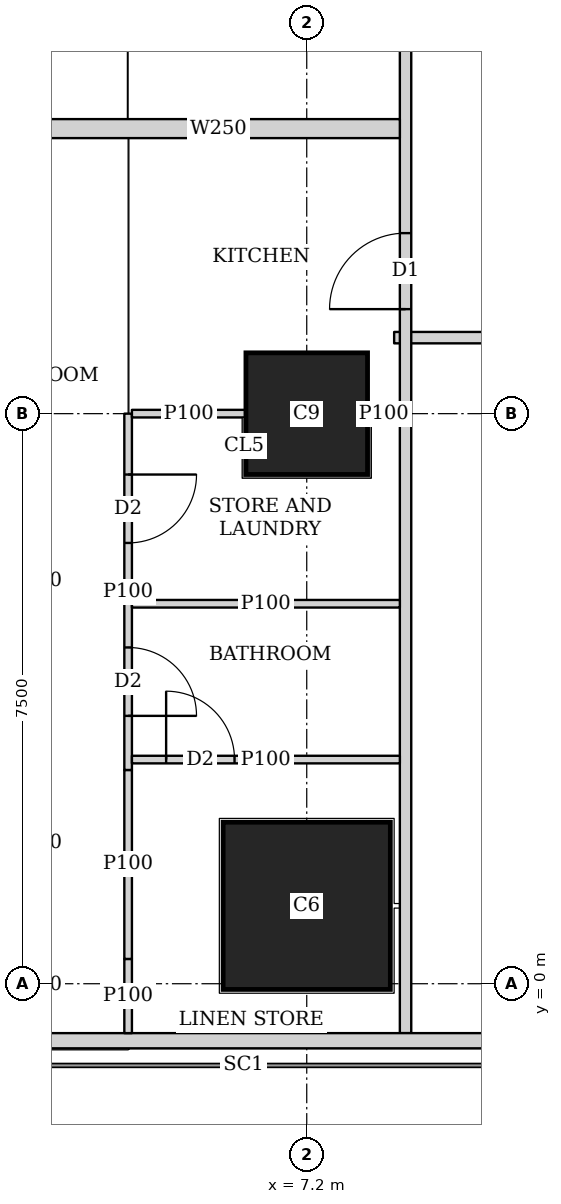
"""IFC4 building model, lengths in metres.
Left out: names, types, materials, properties, quantities, classifications, styles, units other than length and angle.
Written with IfcOpenShell. Run it as: python <this file> out.ifc"""

import sys

from ifc_helpers import new_model, si_unit, direction, frame, frame_2d, origin, origin_2d, place, context, subcontext, project, spatial, rectangle, extrude, element, fill, save


model = new_model("IFC4")
c1 = context("Model", 3, precision=1e-05, world=origin(), true_north=direction((0.0, 1.0)))
c2 = subcontext(c1, "Body", "Model", "MODEL_VIEW")
j1 = project(units=[si_unit("LENGTHUNIT", "METRE"), si_unit("PLANEANGLEUNIT", "RADIAN")], contexts=[c1])
p1 = place(None, origin())
s1 = spatial("IfcSite", under=j1, at=p1, CompositionType="ELEMENT")
p2 = place(p1, origin())
s2 = spatial("IfcBuilding", under=s1, at=p2, CompositionType="ELEMENT")
p3 = place(p2, frame((0.0, 0.0, 111.65)))
s3 = spatial("IfcBuildingStorey", under=s2, at=p3, CompositionType="ELEMENT", Elevation=111.65)
p4 = place(p3, frame((7.2, 1.025, 0.0), z_axis=(0.0, 0.0, 1.0), x_axis=(1.0, 0.0, 0.0)))
e1 = element("IfcColumn", 1, at=p4, inside=s3, PredefinedType="COLUMN", context=c2, shape_type="SweptSolid", body=[
    extrude(rectangle(XDim=2.2, YDim=2.2, at=origin_2d()), origin(), (0.0, 0.0, 1.0), 3.75),
])
p5 = place(p3, frame((7.2, 7.5, 0.0), z_axis=(0.0, 0.0, 1.0), x_axis=(1.0, 0.0, 0.0)))
e2 = element("IfcColumn", 2, at=p5, inside=s3, PredefinedType="COLUMN", context=c2, shape_type="SweptSolid", body=[
    extrude(rectangle(XDim=1.6, YDim=1.6, at=origin_2d()), origin(), (0.0, 0.0, 1.0), 3.75),
])
p6 = place(p3, frame((2.163, -0.75, 0.0), z_axis=(0.0, 0.0, 1.0), x_axis=(1.0, 0.0, 0.0)))
e3 = element("IfcWall", 3, at=p6, inside=s3, PredefinedType="SOLIDWALL", context=c2, shape_type="SweptSolid", body=[
    extrude(rectangle(XDim=45.628, YDim=0.2, at=frame_2d((22.814, 0.0))), origin(), (0.0, 0.0, 1.0), 3.5),
])
p7 = place(p6, frame((9.537, 0.0, 0.9)))
e4 = element("IfcOpeningElement", 4, at=p7, cuts=e3, PredefinedType="OPENING", context=c2, shape_type="SweptSolid", body=[
    extrude(rectangle(XDim=1.8, YDim=1.5, at=frame_2d((0.9, 0.75))), frame((0.0, 0.11, 0.0), z_axis=(0.0, -1.0, 0.0), x_axis=(1.0, 0.0, 0.0)), (0.0, 0.0, 1.0), 0.22),
])
p8 = place(p6, frame((13.137, 0.0, 0.9)))
e5 = element("IfcOpeningElement", 5, at=p8, cuts=e3, PredefinedType="OPENING", context=c2, shape_type="SweptSolid", body=[
    extrude(rectangle(XDim=1.8, YDim=1.5, at=frame_2d((0.9, 0.75))), frame((0.0, 0.11, 0.0), z_axis=(0.0, -1.0, 0.0), x_axis=(1.0, 0.0, 0.0)), (0.0, 0.0, 1.0), 0.22),
])
p9 = place(p6, frame((16.737, 0.0, 0.9)))
e6 = element("IfcOpeningElement", 6, at=p9, cuts=e3, PredefinedType="OPENING", context=c2, shape_type="SweptSolid", body=[
    extrude(rectangle(XDim=1.8, YDim=1.5, at=frame_2d((0.9, 0.75))), frame((0.0, 0.11, 0.0), z_axis=(0.0, -1.0, 0.0), x_axis=(1.0, 0.0, 0.0)), (0.0, 0.0, 1.0), 0.22),
])
p10 = place(p6, frame((20.337, 0.0, 0.9)))
e7 = element("IfcOpeningElement", 7, at=p10, cuts=e3, PredefinedType="OPENING", context=c2, shape_type="SweptSolid", body=[
    extrude(rectangle(XDim=1.8, YDim=1.5, at=frame_2d((0.9, 0.75))), frame((0.0, 0.11, 0.0), z_axis=(0.0, -1.0, 0.0), x_axis=(1.0, 0.0, 0.0)), (0.0, 0.0, 1.0), 0.22),
])
p11 = place(p6, frame((23.937, 0.0, 0.9)))
e8 = element("IfcOpeningElement", 8, at=p11, cuts=e3, PredefinedType="OPENING", context=c2, shape_type="SweptSolid", body=[
    extrude(rectangle(XDim=1.8, YDim=1.5, at=frame_2d((0.9, 0.75))), frame((0.0, 0.11, 0.0), z_axis=(0.0, -1.0, 0.0), x_axis=(1.0, 0.0, 0.0)), (0.0, 0.0, 1.0), 0.22),
])
p12 = place(p6, frame((27.537, 0.0, 0.9)))
e9 = element("IfcOpeningElement", 9, at=p12, cuts=e3, PredefinedType="OPENING", context=c2, shape_type="SweptSolid", body=[
    extrude(rectangle(XDim=1.8, YDim=1.5, at=frame_2d((0.9, 0.75))), frame((0.0, 0.11, 0.0), z_axis=(0.0, -1.0, 0.0), x_axis=(1.0, 0.0, 0.0)), (0.0, 0.0, 1.0), 0.22),
])
p13 = place(p6, frame((31.137, 0.0, 0.9)))
e10 = element("IfcOpeningElement", 10, at=p13, cuts=e3, PredefinedType="OPENING", context=c2, shape_type="SweptSolid", body=[
    extrude(rectangle(XDim=1.8, YDim=1.5, at=frame_2d((0.9, 0.75))), frame((0.0, 0.11, 0.0), z_axis=(0.0, -1.0, 0.0), x_axis=(1.0, 0.0, 0.0)), (0.0, 0.0, 1.0), 0.22),
])
p14 = place(p6, frame((34.737, 0.0, 0.9)))
e11 = element("IfcOpeningElement", 11, at=p14, cuts=e3, PredefinedType="OPENING", context=c2, shape_type="SweptSolid", body=[
    extrude(rectangle(XDim=1.8, YDim=1.5, at=frame_2d((0.9, 0.75))), frame((0.0, 0.11, 0.0), z_axis=(0.0, -1.0, 0.0), x_axis=(1.0, 0.0, 0.0)), (0.0, 0.0, 1.0), 0.22),
])
p15 = place(p3, frame((8.5, -0.65, 0.0), z_axis=(0.0, 0.0, 1.0), x_axis=(0.0, 1.0, 0.0)))
e12 = element("IfcWall", 12, at=p15, inside=s3, PredefinedType="SOLIDWALL", context=c2, shape_type="SweptSolid", body=[
    extrude(rectangle(XDim=46.3, YDim=0.15, at=frame_2d((23.15, 0.0))), origin(), (0.0, 0.0, 1.0), 2.2),
])
p16 = place(p15, frame((9.525, 0.0, 0.0)))
e13 = element("IfcOpeningElement", 13, at=p16, cuts=e12, PredefinedType="OPENING", context=c2, shape_type="SweptSolid", body=[
    extrude(rectangle(XDim=1.0, YDim=2.1, at=frame_2d((0.5, 1.05))), frame((0.0, 0.085, 0.0), z_axis=(0.0, -1.0, 0.0), x_axis=(1.0, 0.0, 0.0)), (0.0, 0.0, 1.0), 0.17),
])
p17 = place(p15, frame((13.275, 0.0, 0.0)))
e14 = element("IfcOpeningElement", 14, at=p17, cuts=e12, PredefinedType="OPENING", context=c2, shape_type="SweptSolid", body=[
    extrude(rectangle(XDim=1.0, YDim=2.1, at=frame_2d((0.5, 1.05))), frame((0.0, 0.085, 0.0), z_axis=(0.0, -1.0, 0.0), x_axis=(1.0, 0.0, 0.0)), (0.0, 0.0, 1.0), 0.17),
])
p18 = place(p15, frame((25.15, 0.0, 0.0)))
e15 = element("IfcOpeningElement", 15, at=p18, cuts=e12, PredefinedType="OPENING", context=c2, shape_type="SweptSolid", body=[
    extrude(rectangle(XDim=1.0, YDim=2.1, at=frame_2d((0.5, 1.05))), frame((0.0, 0.085, 0.0), z_axis=(0.0, -1.0, 0.0), x_axis=(1.0, 0.0, 0.0)), (0.0, 0.0, 1.0), 0.17),
])
p19 = place(p3, frame((40.053, 8.5, 0.0), z_axis=(0.0, 0.0, 1.0), x_axis=(-1.0, 0.0, 0.0)))
e16 = element("IfcWall", 16, at=p19, inside=s3, PredefinedType="SOLIDWALL", context=c2, shape_type="SweptSolid", body=[
    extrude(rectangle(XDim=31.703, YDim=0.15, at=frame_2d((15.852, 0.0))), origin(), (0.0, 0.0, 1.0), 3.5),
])
p20 = place(p19, frame((28.103, 0.0, 0.0)))
e17 = element("IfcOpeningElement", 17, at=p20, cuts=e16, PredefinedType="OPENING", context=c2, shape_type="SweptSolid", body=[
    extrude(rectangle(XDim=1.0, YDim=2.1, at=frame_2d((0.5, 1.05))), frame((0.0, 0.085, 0.0), z_axis=(0.0, -1.0, 0.0), x_axis=(1.0, 0.0, 0.0)), (0.0, 0.0, 1.0), 0.17),
])
p21 = place(p19, frame((19.754, 0.0, 0.0)))
e18 = element("IfcOpeningElement", 18, at=p21, cuts=e16, PredefinedType="OPENING", context=c2, shape_type="SweptSolid", body=[
    extrude(rectangle(XDim=1.0, YDim=2.1, at=frame_2d((0.5, 1.05))), frame((0.0, 0.085, 0.0), z_axis=(0.0, -1.0, 0.0), x_axis=(1.0, 0.0, 0.0)), (0.0, 0.0, 1.0), 0.17),
])
p22 = place(p19, frame((8.353, 0.0, 0.0)))
e19 = element("IfcOpeningElement", 19, at=p22, cuts=e16, PredefinedType="OPENING", context=c2, shape_type="SweptSolid", body=[
    extrude(rectangle(XDim=1.0, YDim=2.1, at=frame_2d((0.5, 1.05))), frame((0.0, 0.085, 0.0), z_axis=(0.0, -1.0, 0.0), x_axis=(1.0, 0.0, 0.0)), (0.0, 0.0, 1.0), 0.17),
])
p23 = place(p3, frame((4.85, -0.65, 0.0), z_axis=(0.0, 0.0, 1.0), x_axis=(0.0, 1.0, 0.0)))
e20 = element("IfcWall", 20, at=p23, inside=s3, PredefinedType="PARTITIONING", context=c2, shape_type="SweptSolid", body=[
    extrude(rectangle(XDim=0.976, YDim=0.1, at=frame_2d((0.488, 0.0))), origin(), (0.0, 0.0, 1.0), 3.5),
])
p24 = place(p3, frame((4.85, 0.326, 0.0), z_axis=(0.0, 0.0, 1.0), x_axis=(0.0, 1.0, 0.0)))
e21 = element("IfcWall", 21, at=p24, inside=s3, PredefinedType="PARTITIONING", context=c2, shape_type="SweptSolid", body=[
    extrude(rectangle(XDim=2.486, YDim=0.1, at=frame_2d((1.243, 0.0))), origin(), (0.0, 0.0, 1.0), 2.05),
])
p25 = place(p3, frame((4.85, 2.812, 0.0), z_axis=(0.0, 0.0, 1.0), x_axis=(0.0, 1.0, 0.0)))
e22 = element("IfcWall", 22, at=p25, inside=s3, PredefinedType="PARTITIONING", context=c2, shape_type="SweptSolid", body=[
    extrude(rectangle(XDim=4.688, YDim=0.1, at=frame_2d((2.344, 0.0))), origin(), (0.0, 0.0, 1.0), 3.5),
])
p26 = place(p25, frame((2.987, 0.0, 0.0)))
e23 = element("IfcOpeningElement", 23, at=p26, cuts=e22, PredefinedType="OPENING", context=c2, shape_type="SweptSolid", body=[
    extrude(rectangle(XDim=0.9, YDim=2.1, at=frame_2d((0.45, 1.05))), frame((0.0, 0.06, 0.0), z_axis=(0.0, -1.0, 0.0), x_axis=(1.0, 0.0, 0.0)), (0.0, 0.0, 1.0), 0.12),
])
p27 = place(p25, frame((0.712, 0.0, 0.0)))
e24 = element("IfcOpeningElement", 24, at=p27, cuts=e22, PredefinedType="OPENING", context=c2, shape_type="SweptSolid", body=[
    extrude(rectangle(XDim=0.9, YDim=2.1, at=frame_2d((0.45, 1.05))), frame((0.0, 0.06, 0.0), z_axis=(0.0, -1.0, 0.0), x_axis=(1.0, 0.0, 0.0)), (0.0, 0.0, 1.0), 0.12),
])
p28 = place(p3, frame((4.9, 4.999, 0.0), z_axis=(0.0, 0.0, 1.0), x_axis=(1.0, 0.0, 0.0)))
e25 = element("IfcWall", 25, at=p28, inside=s3, PredefinedType="PARTITIONING", context=c2, shape_type="SweptSolid", body=[
    extrude(rectangle(XDim=3.525, YDim=0.1, at=frame_2d((1.763, 0.0))), origin(), (0.0, 0.0, 1.0), 3.5),
])
p29 = place(p3, frame((4.9, 7.5, 0.0), z_axis=(0.0, 0.0, 1.0), x_axis=(1.0, 0.0, 0.0)))
e26 = element("IfcWall", 26, at=p29, inside=s3, PredefinedType="PARTITIONING", context=c2, shape_type="SweptSolid", body=[
    extrude(rectangle(XDim=1.499, YDim=0.1, at=frame_2d((0.75, 0.0))), origin(), (0.0, 0.0, 1.0), 3.5),
])
p30 = place(p3, frame((8.001, 7.5, 0.0), z_axis=(0.0, 0.0, 1.0), x_axis=(1.0, 0.0, 0.0)))
e27 = element("IfcWall", 27, at=p30, inside=s3, PredefinedType="PARTITIONING", context=c2, shape_type="SweptSolid", body=[
    extrude(rectangle(XDim=0.424, YDim=0.1, at=frame_2d((0.212, 0.0))), origin(), (0.0, 0.0, 1.0), 3.5),
])
p31 = place(p3, frame((4.9, 2.949, 0.0), z_axis=(0.0, 0.0, 1.0), x_axis=(1.0, 0.0, 0.0)))
e28 = element("IfcWall", 28, at=p31, inside=s3, PredefinedType="PARTITIONING", context=c2, shape_type="SweptSolid", body=[
    extrude(rectangle(XDim=3.525, YDim=0.1, at=frame_2d((1.763, 0.0))), origin(), (0.0, 0.0, 1.0), 3.5),
])
p32 = place(p31, frame((0.45, 0.0, 0.0)))
e29 = element("IfcOpeningElement", 29, at=p32, cuts=e28, PredefinedType="OPENING", context=c2, shape_type="SweptSolid", body=[
    extrude(rectangle(XDim=0.9, YDim=2.1, at=frame_2d((0.45, 1.05))), frame((0.0, 0.06, 0.0), z_axis=(0.0, -1.0, 0.0), x_axis=(1.0, 0.0, 0.0)), (0.0, 0.0, 1.0), 0.12),
])
p33 = place(p3, frame((3.65, 11.25, 0.0), z_axis=(0.0, 0.0, 1.0), x_axis=(1.0, 0.0, 0.0)))
e30 = element("IfcWall", 30, at=p33, inside=s3, PredefinedType="SOLIDWALL", context=c2, shape_type="SweptSolid", body=[
    extrude(rectangle(XDim=4.775, YDim=0.25, at=frame_2d((2.388, 0.0))), origin(), (0.0, 0.0, 1.0), 3.5),
])
p34 = place(p26, origin())
e31 = element("IfcDoor", 31, at=p34, inside=s3, OperationType="SINGLE_SWING_LEFT", PredefinedType="DOOR", context=c2, shape_type="SweptSolid", body=[
    extrude(rectangle(XDim=0.9, YDim=2.1, at=frame_2d((0.45, 1.05))), frame((0.0, 0.025, 0.0), z_axis=(0.0, -1.0, 0.0), x_axis=(1.0, 0.0, 0.0)), (0.0, 0.0, 1.0), 0.05),
])
fill(e23, e31)
p35 = place(p27, origin())
e32 = element("IfcDoor", 32, at=p35, inside=s3, OperationType="SINGLE_SWING_RIGHT", PredefinedType="DOOR", context=c2, shape_type="SweptSolid", body=[
    extrude(rectangle(XDim=0.9, YDim=2.1, at=frame_2d((0.45, 1.05))), frame((0.0, 0.025, 0.0), z_axis=(0.0, -1.0, 0.0), x_axis=(1.0, 0.0, 0.0)), (0.0, 0.0, 1.0), 0.05),
])
fill(e24, e32)
p36 = place(p32, origin())
e33 = element("IfcDoor", 33, at=p36, inside=s3, OperationType="SINGLE_SWING_LEFT", PredefinedType="DOOR", context=c2, shape_type="SweptSolid", body=[
    extrude(rectangle(XDim=0.9, YDim=2.1, at=frame_2d((0.45, 1.05))), frame((0.0, 0.025, 0.0), z_axis=(0.0, -1.0, 0.0), x_axis=(1.0, 0.0, 0.0)), (0.0, 0.0, 1.0), 0.05),
])
fill(e29, e33)
p37 = place(p16, origin())
e34 = element("IfcDoor", 34, at=p37, inside=s3, OperationType="SINGLE_SWING_LEFT", PredefinedType="DOOR", context=c2, shape_type="SweptSolid", body=[
    extrude(rectangle(XDim=1.0, YDim=2.1, at=frame_2d((0.5, 1.05))), frame((0.0, 0.025, 0.0), z_axis=(0.0, -1.0, 0.0), x_axis=(1.0, 0.0, 0.0)), (0.0, 0.0, 1.0), 0.05),
])
fill(e13, e34)
save(model, sys.argv[1])
